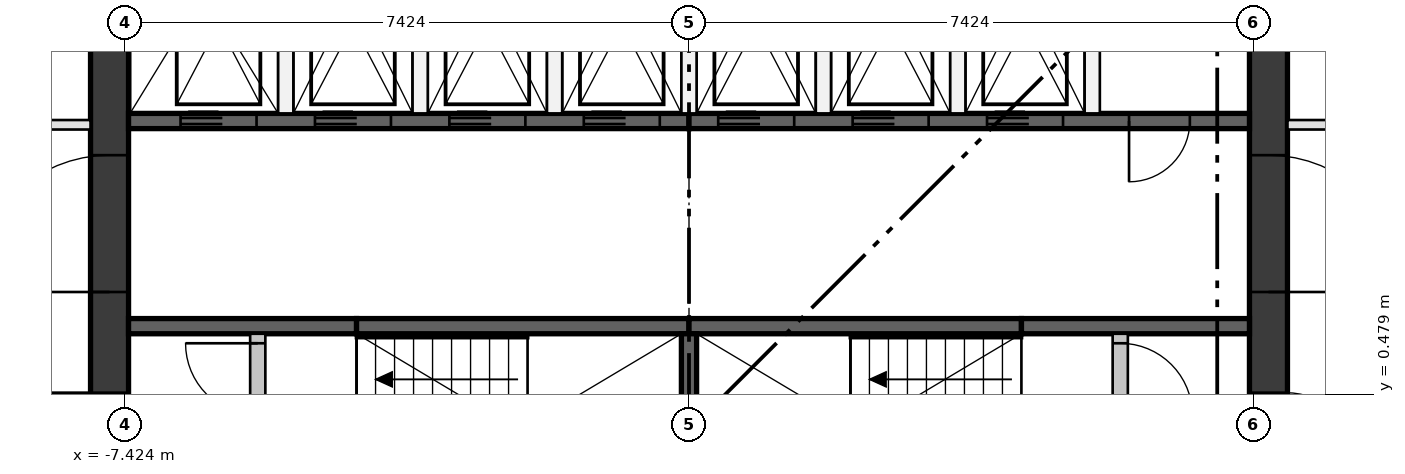
"""IFC4 building model, lengths in metres.
Left out: names, types, materials, properties, quantities, classifications, styles, units other than length and angle.
Written with IfcOpenShell. Run it as: python <this file> out.ifc"""

import sys

from ifc_helpers import new_model, si_unit, direction, frame, frame_2d, origin, place, context, subcontext, project, spatial, rectangle, extrude, element, fill, save


model = new_model("IFC4")
c1 = context("Model", 3, precision=1e-05, world=origin(), true_north=direction((0.0, 1.0)))
c2 = subcontext(c1, "Body", "Model", "MODEL_VIEW")
j1 = project(units=[si_unit("LENGTHUNIT", "METRE"), si_unit("PLANEANGLEUNIT", "RADIAN")], contexts=[c1])
p1 = place(None, origin())
s1 = spatial("IfcSite", under=j1, at=p1, CompositionType="ELEMENT")
p2 = place(p1, origin())
s2 = spatial("IfcBuilding", under=s1, at=p2, CompositionType="ELEMENT")
p3 = place(p2, frame((0.0, 0.0, 177.6)))
s3 = spatial("IfcBuildingStorey", under=s2, at=p3, CompositionType="ELEMENT", Elevation=177.6)
p4 = place(p3, frame((-7.624, -7.374, 0.0), z_axis=(0.0, 0.0, 1.0), x_axis=(0.0, 1.0, 0.0)))
e1 = element("IfcWall", 1, at=p4, inside=s3, PredefinedType="SHEAR", context=c2, shape_type="SweptSolid", body=[
    extrude(rectangle(XDim=14.748, YDim=0.5, at=frame_2d((7.374, 0.0))), origin(), (0.0, 0.0, 1.0), 3.35),
])
p5 = place(p4, frame((6.874, 0.0, 0.0)))
e2 = element("IfcOpeningElement", 2, at=p5, cuts=e1, PredefinedType="OPENING", context=c2, shape_type="SweptSolid", body=[
    extrude(rectangle(XDim=1.0, YDim=2.1, at=frame_2d((0.5, 1.05))), frame((0.0, 0.26, 0.0), z_axis=(0.0, -1.0, 0.0), x_axis=(1.0, 0.0, 0.0)), (0.0, 0.0, 1.0), 0.52),
])
p6 = place(p4, frame((3.75, 0.0, 0.0)))
e3 = element("IfcOpeningElement", 3, at=p6, cuts=e1, PredefinedType="OPENING", context=c2, shape_type="SweptSolid", body=[
    extrude(rectangle(XDim=1.8, YDim=2.1, at=frame_2d((0.9, 1.05))), frame((0.0, 0.26, 0.0), z_axis=(0.0, -1.0, 0.0), x_axis=(1.0, 0.0, 0.0)), (0.0, 0.0, 1.0), 0.52),
])
p7 = place(p4, frame((9.198, 0.0, 0.0)))
e4 = element("IfcOpeningElement", 4, at=p7, cuts=e1, PredefinedType="OPENING", context=c2, shape_type="SweptSolid", body=[
    extrude(rectangle(XDim=1.8, YDim=2.1, at=frame_2d((0.9, 1.05))), frame((0.0, 0.26, 0.0), z_axis=(0.0, -1.0, 0.0), x_axis=(1.0, 0.0, 0.0)), (0.0, 0.0, 1.0), 0.52),
])
p8 = place(p3, frame((7.624, -7.374, 0.0), z_axis=(0.0, 0.0, 1.0), x_axis=(0.0, 1.0, 0.0)))
e5 = element("IfcWall", 5, at=p8, inside=s3, PredefinedType="SHEAR", context=c2, shape_type="SweptSolid", body=[
    extrude(rectangle(XDim=14.748, YDim=0.5, at=frame_2d((7.374, 0.0))), origin(), (0.0, 0.0, 1.0), 3.35),
])
p9 = place(p8, frame((6.874, 0.0, 0.0)))
e6 = element("IfcOpeningElement", 6, at=p9, cuts=e5, PredefinedType="OPENING", context=c2, shape_type="SweptSolid", body=[
    extrude(rectangle(XDim=1.0, YDim=2.1, at=frame_2d((0.5, 1.05))), frame((0.0, 0.26, 0.0), z_axis=(0.0, -1.0, 0.0), x_axis=(1.0, 0.0, 0.0)), (0.0, 0.0, 1.0), 0.52),
])
p10 = place(p8, frame((3.75, 0.0, 0.0)))
e7 = element("IfcOpeningElement", 7, at=p10, cuts=e5, PredefinedType="OPENING", context=c2, shape_type="SweptSolid", body=[
    extrude(rectangle(XDim=1.8, YDim=2.1, at=frame_2d((0.9, 1.05))), frame((0.0, 0.26, 0.0), z_axis=(0.0, -1.0, 0.0), x_axis=(1.0, 0.0, 0.0)), (0.0, 0.0, 1.0), 0.52),
])
p11 = place(p8, frame((9.198, 0.0, 0.0)))
e8 = element("IfcOpeningElement", 8, at=p11, cuts=e5, PredefinedType="OPENING", context=c2, shape_type="SweptSolid", body=[
    extrude(rectangle(XDim=1.8, YDim=2.1, at=frame_2d((0.9, 1.05))), frame((0.0, 0.26, 0.0), z_axis=(0.0, -1.0, 0.0), x_axis=(1.0, 0.0, 0.0)), (0.0, 0.0, 1.0), 0.52),
])
p12 = place(p3, frame((-7.374, 4.074, 0.0), z_axis=(0.0, 0.0, 1.0), x_axis=(1.0, 0.0, 0.0)))
e9 = element("IfcWall", 9, at=p12, inside=s3, PredefinedType="SHEAR", context=c2, shape_type="SweptSolid", body=[
    extrude(rectangle(XDim=7.374, YDim=0.2, at=frame_2d((3.687, 0.0))), origin(), (0.0, 0.0, 1.0), 3.0),
])
p13 = place(p12, frame((0.684, 0.0, 0.0)))
e10 = element("IfcOpeningElement", 10, at=p13, cuts=e9, PredefinedType="OPENING", context=c2, shape_type="SweptSolid", body=[
    extrude(rectangle(XDim=1.0, YDim=2.1, at=frame_2d((0.5, 1.05))), frame((0.0, 0.11, 0.0), z_axis=(0.0, -1.0, 0.0), x_axis=(1.0, 0.0, 0.0)), (0.0, 0.0, 1.0), 0.22),
])
p14 = place(p12, frame((2.453, 0.0, 0.0)))
e11 = element("IfcOpeningElement", 11, at=p14, cuts=e9, PredefinedType="OPENING", context=c2, shape_type="SweptSolid", body=[
    extrude(rectangle(XDim=1.0, YDim=2.1, at=frame_2d((0.5, 1.05))), frame((0.0, 0.11, 0.0), z_axis=(0.0, -1.0, 0.0), x_axis=(1.0, 0.0, 0.0)), (0.0, 0.0, 1.0), 0.22),
])
p15 = place(p12, frame((4.221, 0.0, 0.0)))
e12 = element("IfcOpeningElement", 12, at=p15, cuts=e9, PredefinedType="OPENING", context=c2, shape_type="SweptSolid", body=[
    extrude(rectangle(XDim=1.0, YDim=2.1, at=frame_2d((0.5, 1.05))), frame((0.0, 0.11, 0.0), z_axis=(0.0, -1.0, 0.0), x_axis=(1.0, 0.0, 0.0)), (0.0, 0.0, 1.0), 0.22),
])
p16 = place(p12, frame((5.99, 0.0, 0.0)))
e13 = element("IfcOpeningElement", 13, at=p16, cuts=e9, PredefinedType="OPENING", context=c2, shape_type="SweptSolid", body=[
    extrude(rectangle(XDim=1.0, YDim=2.1, at=frame_2d((0.5, 1.05))), frame((0.0, 0.11, 0.0), z_axis=(0.0, -1.0, 0.0), x_axis=(1.0, 0.0, 0.0)), (0.0, 0.0, 1.0), 0.22),
])
p17 = place(p3, frame((0.0, 4.074, 0.0), z_axis=(0.0, 0.0, 1.0), x_axis=(1.0, 0.0, 0.0)))
e14 = element("IfcWall", 14, at=p17, inside=s3, PredefinedType="SHEAR", context=c2, shape_type="SweptSolid", body=[
    extrude(rectangle(XDim=7.374, YDim=0.2, at=frame_2d((3.687, 0.0))), origin(), (0.0, 0.0, 1.0), 3.0),
])
p18 = place(p17, frame((0.384, 0.0, 0.0)))
e15 = element("IfcOpeningElement", 15, at=p18, cuts=e14, PredefinedType="OPENING", context=c2, shape_type="SweptSolid", body=[
    extrude(rectangle(XDim=1.0, YDim=2.1, at=frame_2d((0.5, 1.05))), frame((0.0, 0.11, 0.0), z_axis=(0.0, -1.0, 0.0), x_axis=(1.0, 0.0, 0.0)), (0.0, 0.0, 1.0), 0.22),
])
p19 = place(p17, frame((2.153, 0.0, 0.0)))
e16 = element("IfcOpeningElement", 16, at=p19, cuts=e14, PredefinedType="OPENING", context=c2, shape_type="SweptSolid", body=[
    extrude(rectangle(XDim=1.0, YDim=2.1, at=frame_2d((0.5, 1.05))), frame((0.0, 0.11, 0.0), z_axis=(0.0, -1.0, 0.0), x_axis=(1.0, 0.0, 0.0)), (0.0, 0.0, 1.0), 0.22),
])
p20 = place(p17, frame((3.921, 0.0, 0.0)))
e17 = element("IfcOpeningElement", 17, at=p20, cuts=e14, PredefinedType="OPENING", context=c2, shape_type="SweptSolid", body=[
    extrude(rectangle(XDim=1.0, YDim=2.1, at=frame_2d((0.5, 1.05))), frame((0.0, 0.11, 0.0), z_axis=(0.0, -1.0, 0.0), x_axis=(1.0, 0.0, 0.0)), (0.0, 0.0, 1.0), 0.22),
])
p21 = place(p17, frame((5.79, 0.0, 0.0)))
e18 = element("IfcOpeningElement", 18, at=p21, cuts=e14, PredefinedType="OPENING", context=c2, shape_type="SweptSolid", body=[
    extrude(rectangle(XDim=0.8, YDim=2.1, at=frame_2d((0.4, 1.05))), frame((0.0, 0.11, 0.0), z_axis=(0.0, -1.0, 0.0), x_axis=(1.0, 0.0, 0.0)), (0.0, 0.0, 1.0), 0.22),
])
p22 = place(p3, frame((-7.374, 1.375, 0.0), z_axis=(0.0, 0.0, 1.0), x_axis=(1.0, 0.0, 0.0)))
e19 = element("IfcWall", 19, at=p22, inside=s3, PredefinedType="SHEAR", context=c2, shape_type="SweptSolid", body=[
    extrude(rectangle(XDim=3.0, YDim=0.2, at=frame_2d((1.5, 0.0))), origin(), (0.0, 0.0, 1.0), 3.0),
])
for number, where, z_axis, x_axis in (
    (20, (-4.374, 1.375, 0.0), (0.0, 0.0, 1.0), (1.0, 0.0, 0.0)),
    (21, (0.0, 1.375, 0.0), (0.0, 0.0, 1.0), (1.0, 0.0, 0.0)),
):
    element("IfcWall", number, at=place(p3, frame(where, z_axis=z_axis, x_axis=x_axis)), inside=s3, PredefinedType="SHEAR", context=c2, shape_type="SweptSolid", body=[
        extrude(rectangle(XDim=4.374, YDim=0.2, at=frame_2d((2.187, 0.0))), origin(), (0.0, 0.0, 1.0), 3.0),
    ])
p23 = place(p3, frame((4.374, 1.375, 0.0), z_axis=(0.0, 0.0, 1.0), x_axis=(1.0, 0.0, 0.0)))
e22 = element("IfcWall", 22, at=p23, inside=s3, PredefinedType="SHEAR", context=c2, shape_type="SweptSolid", body=[
    extrude(rectangle(XDim=3.0, YDim=0.2, at=frame_2d((1.5, 0.0))), origin(), (0.0, 0.0, 1.0), 3.0),
])
p24 = place(p3, frame((0.0, -1.275, 0.0), z_axis=(0.0, 0.0, 1.0), x_axis=(0.0, 1.0, 0.0)))
e23 = element("IfcWall", 23, at=p24, inside=s3, PredefinedType="SHEAR", context=c2, shape_type="SweptSolid", body=[
    extrude(rectangle(XDim=2.55, YDim=0.2, at=frame_2d((1.275, 0.0))), origin(), (0.0, 0.0, 1.0), 3.0),
])
for number, where, z_axis, x_axis in (
    (24, (-5.305, 4.174, 0.0), (0.0, 0.0, 1.0), (0.0, 1.0, 0.0)),
    (25, (-3.537, 4.174, 0.0), (0.0, 0.0, 1.0), (0.0, 1.0, 0.0)),
    (26, (-1.769, 4.174, 0.0), (0.0, 0.0, 1.0), (0.0, 1.0, 0.0)),
    (27, (0.0, 4.174, 0.0), (0.0, 0.0, 1.0), (0.0, 1.0, 0.0)),
    (28, (1.769, 4.174, 0.0), (0.0, 0.0, 1.0), (0.0, 1.0, 0.0)),
    (29, (3.537, 4.174, 0.0), (0.0, 0.0, 1.0), (0.0, 1.0, 0.0)),
    (30, (5.305, 4.174, 0.0), (0.0, 0.0, 1.0), (0.0, 1.0, 0.0)),
):
    element("IfcWall", number, at=place(p3, frame(where, z_axis=z_axis, x_axis=x_axis)), inside=s3, PredefinedType="PARTITIONING", context=c2, shape_type="SweptSolid", body=[
        extrude(rectangle(XDim=3.2, YDim=0.2, at=frame_2d((1.6, 0.0))), origin(), (0.0, 0.0, 1.0), 3.0),
    ])
p25 = place(p3, frame((-5.674, -1.275, 0.0), z_axis=(0.0, 0.0, 1.0), x_axis=(0.0, 1.0, 0.0)))
e31 = element("IfcWall", 31, at=p25, inside=s3, PredefinedType="PARTITIONING", context=c2, shape_type="SweptSolid", body=[
    extrude(rectangle(XDim=2.55, YDim=0.2, at=frame_2d((1.275, 0.0))), origin(), (0.0, 0.0, 1.0), 3.0),
])
p26 = place(p25, frame((0.125, 0.0, 0.0)))
e32 = element("IfcOpeningElement", 32, at=p26, cuts=e31, PredefinedType="OPENING", context=c2, shape_type="SweptSolid", body=[
    extrude(rectangle(XDim=0.95, YDim=2.1, at=frame_2d((0.475, 1.05))), frame((0.0, 0.11, 0.0), z_axis=(0.0, -1.0, 0.0), x_axis=(1.0, 0.0, 0.0)), (0.0, 0.0, 1.0), 0.22),
])
p27 = place(p25, frame((1.475, 0.0, 0.0)))
e33 = element("IfcOpeningElement", 33, at=p27, cuts=e31, PredefinedType="OPENING", context=c2, shape_type="SweptSolid", body=[
    extrude(rectangle(XDim=0.95, YDim=2.1, at=frame_2d((0.475, 1.05))), frame((0.0, 0.11, 0.0), z_axis=(0.0, -1.0, 0.0), x_axis=(1.0, 0.0, 0.0)), (0.0, 0.0, 1.0), 0.22),
])
p28 = place(p3, frame((5.674, -1.275, 0.0), z_axis=(0.0, 0.0, 1.0), x_axis=(0.0, 1.0, 0.0)))
e34 = element("IfcWall", 34, at=p28, inside=s3, PredefinedType="PARTITIONING", context=c2, shape_type="SweptSolid", body=[
    extrude(rectangle(XDim=2.55, YDim=0.2, at=frame_2d((1.275, 0.0))), origin(), (0.0, 0.0, 1.0), 3.0),
])
p29 = place(p28, frame((0.125, 0.0, 0.0)))
e35 = element("IfcOpeningElement", 35, at=p29, cuts=e34, PredefinedType="OPENING", context=c2, shape_type="SweptSolid", body=[
    extrude(rectangle(XDim=0.95, YDim=2.1, at=frame_2d((0.475, 1.05))), frame((0.0, 0.11, 0.0), z_axis=(0.0, -1.0, 0.0), x_axis=(1.0, 0.0, 0.0)), (0.0, 0.0, 1.0), 0.22),
])
p30 = place(p28, frame((1.475, 0.0, 0.0)))
e36 = element("IfcOpeningElement", 36, at=p30, cuts=e34, PredefinedType="OPENING", context=c2, shape_type="SweptSolid", body=[
    extrude(rectangle(XDim=0.95, YDim=2.1, at=frame_2d((0.475, 1.05))), frame((0.0, 0.11, 0.0), z_axis=(0.0, -1.0, 0.0), x_axis=(1.0, 0.0, 0.0)), (0.0, 0.0, 1.0), 0.22),
])
p31 = place(p3, frame((7.874, 4.024, 0.0), z_axis=(0.0, 0.0, 1.0), x_axis=(1.0, 0.0, 0.0)))
e37 = element("IfcWall", 37, at=p31, inside=s3, PredefinedType="PARTITIONING", context=c2, shape_type="SweptSolid", body=[
    extrude(rectangle(XDim=5.921, YDim=0.125, at=frame_2d((2.96, 0.0))), origin(), (0.0, 0.0, 1.0), 3.0),
])
p32 = place(p31, frame((2.5, 0.0, 0.0)))
e38 = element("IfcOpeningElement", 38, at=p32, cuts=e37, PredefinedType="OPENING", context=c2, shape_type="SweptSolid", body=[
    extrude(rectangle(XDim=1.0, YDim=2.1, at=frame_2d((0.5, 1.05))), frame((0.0, 0.073, 0.0), z_axis=(0.0, -1.0, 0.0), x_axis=(1.0, 0.0, 0.0)), (0.0, 0.0, 1.0), 0.145),
])
p33 = place(p3, frame((-13.373, 4.024, 0.0), z_axis=(0.0, 0.0, 1.0), x_axis=(1.0, 0.0, 0.0)))
e39 = element("IfcWall", 39, at=p33, inside=s3, PredefinedType="PARTITIONING", context=c2, shape_type="SweptSolid", body=[
    extrude(rectangle(XDim=5.499, YDim=0.125, at=frame_2d((2.75, 0.0))), origin(), (0.0, 0.0, 1.0), 3.0),
])
p34 = place(p33, frame((2.2, 0.0, 0.0)))
e40 = element("IfcOpeningElement", 40, at=p34, cuts=e39, PredefinedType="OPENING", context=c2, shape_type="SweptSolid", body=[
    extrude(rectangle(XDim=1.0, YDim=2.1, at=frame_2d((0.5, 1.05))), frame((0.0, 0.073, 0.0), z_axis=(0.0, -1.0, 0.0), x_axis=(1.0, 0.0, 0.0)), (0.0, 0.0, 1.0), 0.145),
])
p35 = place(p13, frame((1.0, 0.0, 0.0), z_axis=(0.0, 0.0, 1.0), x_axis=(-1.0, 0.0, 0.0)))
e41 = element("IfcDoor", 41, at=p35, inside=s3, OperationType="DOUBLE_DOOR_SLIDING", PredefinedType="DOOR", context=c2, shape_type="SweptSolid", body=[
    extrude(rectangle(XDim=1.0, YDim=2.1, at=frame_2d((0.5, 1.05))), frame((0.0, 0.025, 0.0), z_axis=(0.0, -1.0, 0.0), x_axis=(1.0, 0.0, 0.0)), (0.0, 0.0, 1.0), 0.05),
])
fill(e10, e41)
p36 = place(p14, frame((1.0, 0.0, 0.0), z_axis=(0.0, 0.0, 1.0), x_axis=(-1.0, 0.0, 0.0)))
e42 = element("IfcDoor", 42, at=p36, inside=s3, OperationType="DOUBLE_DOOR_SLIDING", PredefinedType="DOOR", context=c2, shape_type="SweptSolid", body=[
    extrude(rectangle(XDim=1.0, YDim=2.1, at=frame_2d((0.5, 1.05))), frame((0.0, 0.025, 0.0), z_axis=(0.0, -1.0, 0.0), x_axis=(1.0, 0.0, 0.0)), (0.0, 0.0, 1.0), 0.05),
])
fill(e11, e42)
p37 = place(p15, frame((1.0, 0.0, 0.0), z_axis=(0.0, 0.0, 1.0), x_axis=(-1.0, 0.0, 0.0)))
e43 = element("IfcDoor", 43, at=p37, inside=s3, OperationType="DOUBLE_DOOR_SLIDING", PredefinedType="DOOR", context=c2, shape_type="SweptSolid", body=[
    extrude(rectangle(XDim=1.0, YDim=2.1, at=frame_2d((0.5, 1.05))), frame((0.0, 0.025, 0.0), z_axis=(0.0, -1.0, 0.0), x_axis=(1.0, 0.0, 0.0)), (0.0, 0.0, 1.0), 0.05),
])
fill(e12, e43)
p38 = place(p16, frame((1.0, 0.0, 0.0), z_axis=(0.0, 0.0, 1.0), x_axis=(-1.0, 0.0, 0.0)))
e44 = element("IfcDoor", 44, at=p38, inside=s3, OperationType="DOUBLE_DOOR_SLIDING", PredefinedType="DOOR", context=c2, shape_type="SweptSolid", body=[
    extrude(rectangle(XDim=1.0, YDim=2.1, at=frame_2d((0.5, 1.05))), frame((0.0, 0.025, 0.0), z_axis=(0.0, -1.0, 0.0), x_axis=(1.0, 0.0, 0.0)), (0.0, 0.0, 1.0), 0.05),
])
fill(e13, e44)
p39 = place(p18, frame((1.0, 0.0, 0.0), z_axis=(0.0, 0.0, 1.0), x_axis=(-1.0, 0.0, 0.0)))
e45 = element("IfcDoor", 45, at=p39, inside=s3, OperationType="DOUBLE_DOOR_SLIDING", PredefinedType="DOOR", context=c2, shape_type="SweptSolid", body=[
    extrude(rectangle(XDim=1.0, YDim=2.1, at=frame_2d((0.5, 1.05))), frame((0.0, 0.025, 0.0), z_axis=(0.0, -1.0, 0.0), x_axis=(1.0, 0.0, 0.0)), (0.0, 0.0, 1.0), 0.05),
])
fill(e15, e45)
p40 = place(p19, frame((1.0, 0.0, 0.0), z_axis=(0.0, 0.0, 1.0), x_axis=(-1.0, 0.0, 0.0)))
e46 = element("IfcDoor", 46, at=p40, inside=s3, OperationType="DOUBLE_DOOR_SLIDING", PredefinedType="DOOR", context=c2, shape_type="SweptSolid", body=[
    extrude(rectangle(XDim=1.0, YDim=2.1, at=frame_2d((0.5, 1.05))), frame((0.0, 0.025, 0.0), z_axis=(0.0, -1.0, 0.0), x_axis=(1.0, 0.0, 0.0)), (0.0, 0.0, 1.0), 0.05),
])
fill(e16, e46)
p41 = place(p20, frame((1.0, 0.0, 0.0), z_axis=(0.0, 0.0, 1.0), x_axis=(-1.0, 0.0, 0.0)))
e47 = element("IfcDoor", 47, at=p41, inside=s3, OperationType="DOUBLE_DOOR_SLIDING", PredefinedType="DOOR", context=c2, shape_type="SweptSolid", body=[
    extrude(rectangle(XDim=1.0, YDim=2.1, at=frame_2d((0.5, 1.05))), frame((0.0, 0.025, 0.0), z_axis=(0.0, -1.0, 0.0), x_axis=(1.0, 0.0, 0.0)), (0.0, 0.0, 1.0), 0.05),
])
fill(e17, e47)
p42 = place(p27, origin())
e48 = element("IfcDoor", 48, at=p42, inside=s3, OperationType="SINGLE_SWING_RIGHT", PredefinedType="DOOR", context=c2, shape_type="SweptSolid", body=[
    extrude(rectangle(XDim=0.95, YDim=2.1, at=frame_2d((0.475, 1.05))), frame((0.0, 0.025, 0.0), z_axis=(0.0, -1.0, 0.0), x_axis=(1.0, 0.0, 0.0)), (0.0, 0.0, 1.0), 0.05),
])
fill(e33, e48)
p43 = place(p30, frame((0.95, 0.0, 0.0), z_axis=(0.0, 0.0, 1.0), x_axis=(-1.0, 0.0, 0.0)))
e49 = element("IfcDoor", 49, at=p43, inside=s3, OperationType="SINGLE_SWING_LEFT", PredefinedType="DOOR", context=c2, shape_type="SweptSolid", body=[
    extrude(rectangle(XDim=0.95, YDim=2.1, at=frame_2d((0.475, 1.05))), frame((0.0, 0.025, 0.0), z_axis=(0.0, -1.0, 0.0), x_axis=(1.0, 0.0, 0.0)), (0.0, 0.0, 1.0), 0.05),
])
fill(e36, e49)
p44 = place(p21, frame((0.8, 0.0, 0.0), z_axis=(0.0, 0.0, 1.0), x_axis=(-1.0, 0.0, 0.0)))
e50 = element("IfcDoor", 50, at=p44, inside=s3, OperationType="SINGLE_SWING_LEFT", PredefinedType="DOOR", context=c2, shape_type="SweptSolid", body=[
    extrude(rectangle(XDim=0.8, YDim=2.1, at=frame_2d((0.4, 1.05))), frame((0.0, 0.025, 0.0), z_axis=(0.0, -1.0, 0.0), x_axis=(1.0, 0.0, 0.0)), (0.0, 0.0, 1.0), 0.05),
])
fill(e18, e50)
p45 = place(p5, origin())
e51 = element("IfcDoor", 51, at=p45, inside=s3, OperationType="SINGLE_SWING_RIGHT", PredefinedType="DOOR", context=c2, shape_type="SweptSolid", body=[
    extrude(rectangle(XDim=1.0, YDim=2.1, at=frame_2d((0.5, 1.05))), frame((0.0, 0.25, 0.0), z_axis=(0.0, -1.0, 0.0), x_axis=(1.0, 0.0, 0.0)), (0.0, 0.0, 1.0), 0.05),
])
fill(e2, e51)
p46 = place(p7, origin())
e52 = element("IfcDoor", 52, at=p46, inside=s3, OperationType="DOUBLE_DOOR_SINGLE_SWING", PredefinedType="DOOR", context=c2, shape_type="SweptSolid", body=[
    extrude(rectangle(XDim=1.8, YDim=2.1, at=frame_2d((0.9, 1.05))), frame((0.0, 0.025, 0.0), z_axis=(0.0, -1.0, 0.0), x_axis=(1.0, 0.0, 0.0)), (0.0, 0.0, 1.0), 0.05),
])
fill(e4, e52)
p47 = place(p9, frame((1.0, 0.0, 0.0), z_axis=(0.0, 0.0, 1.0), x_axis=(-1.0, 0.0, 0.0)))
e53 = element("IfcDoor", 53, at=p47, inside=s3, OperationType="SINGLE_SWING_LEFT", PredefinedType="DOOR", context=c2, shape_type="SweptSolid", body=[
    extrude(rectangle(XDim=1.0, YDim=2.1, at=frame_2d((0.5, 1.05))), frame((0.0, 0.25, 0.0), z_axis=(0.0, -1.0, 0.0), x_axis=(1.0, 0.0, 0.0)), (0.0, 0.0, 1.0), 0.05),
])
fill(e6, e53)
p48 = place(p11, frame((1.8, 0.0, 0.0), z_axis=(0.0, 0.0, 1.0), x_axis=(-1.0, 0.0, 0.0)))
e54 = element("IfcDoor", 54, at=p48, inside=s3, OperationType="DOUBLE_DOOR_SINGLE_SWING", PredefinedType="DOOR", context=c2, shape_type="SweptSolid", body=[
    extrude(rectangle(XDim=1.8, YDim=2.1, at=frame_2d((0.9, 1.05))), frame((0.0, 0.025, 0.0), z_axis=(0.0, -1.0, 0.0), x_axis=(1.0, 0.0, 0.0)), (0.0, 0.0, 1.0), 0.05),
])
fill(e8, e54)
save(model, sys.argv[1])
